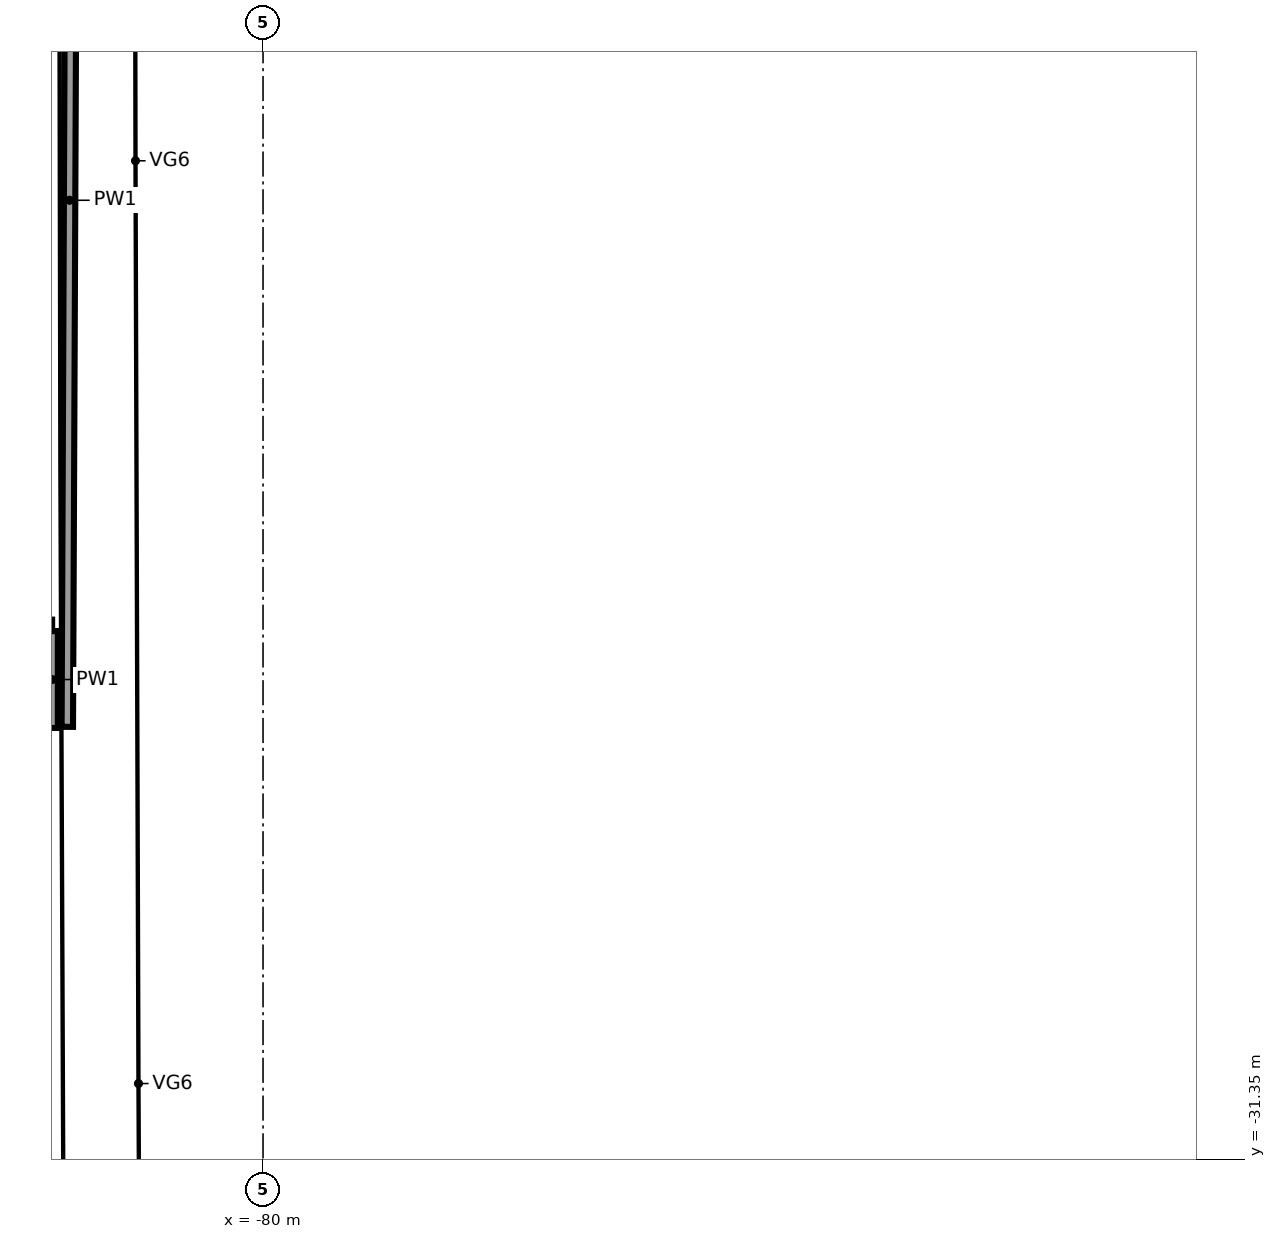
"""IFC4 building model, lengths in metres.
Left out: names, types, materials, properties, quantities, classifications, styles, units other than length and angle.
Written with IfcOpenShell. Run it as: python <this file> out.ifc"""

import sys

from ifc_helpers import new_model, si_unit, direction, frame, frame_2d, origin, place, context, subcontext, project, spatial, rectangle, extrude, element, save


model = new_model("IFC4")
c1 = context("Model", 3, precision=1e-05, world=origin(), true_north=direction((0.0, 1.0)))
c2 = subcontext(c1, "Body", "Model", "MODEL_VIEW")
j1 = project(units=[si_unit("LENGTHUNIT", "METRE"), si_unit("PLANEANGLEUNIT", "RADIAN")], contexts=[c1])
p1 = place(None, origin())
s1 = spatial("IfcSite", under=j1, at=p1, CompositionType="ELEMENT")
p2 = place(p1, origin())
s2 = spatial("IfcBuilding", under=s1, at=p2, CompositionType="ELEMENT")
p3 = place(p2, frame((0.0, 0.0, 24.0)))
s3 = spatial("IfcBuildingStorey", under=s2, at=p3, CompositionType="ELEMENT", Elevation=24.0)
for number, where, z_axis, x_axis in (
    (1, (-82.775, -25.675, 0.0), (0.0, 0.0, 1.0), (0.0, 1.0, 0.0)),
    (2, (-82.775, -24.325, 0.0), (0.0, 0.0, 1.0), (-1.0, 0.0, 0.0)),
):
    element("IfcWall", number, at=place(p3, frame(where, z_axis=z_axis, x_axis=x_axis)), inside=s3, PredefinedType="PARTITIONING", context=c2, shape_type="SweptSolid", body=[
        extrude(rectangle(XDim=1.275, YDim=0.15, at=frame_2d((0.638, 0.0))), origin(), (0.0, 0.0, 1.0), 5.4),
    ])
p4 = place(p3, frame((-82.575, -25.66, 0.0), z_axis=(0.0, 0.0, 1.0), x_axis=(0.004334608277, 0.999990605541, 0.0)))
e3 = element("IfcWall", 3, at=p4, inside=s3, PredefinedType="PARTITIONING", context=c2, shape_type="SweptSolid", body=[
    extrude(rectangle(XDim=13.856, YDim=0.15, at=frame_2d((6.928, 0.0))), origin(), (0.0, 0.0, 1.0), 5.4),
])
save(model, sys.argv[1])
